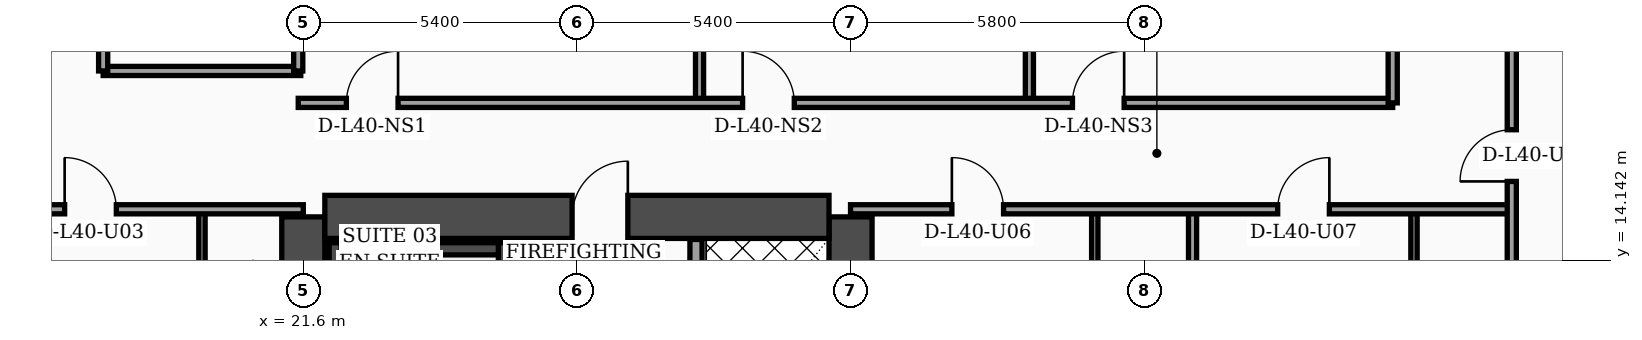
"""IFC4 building model, lengths in metres.
Left out: names, types, materials, properties, quantities, classifications, styles, units other than length and angle.
Written with IfcOpenShell. Run it as: python <this file> out.ifc"""

import sys

from ifc_helpers import new_model, si_unit, direction, frame, frame_2d, origin, place, context, subcontext, project, spatial, rectangle, extrude, element, fill, save


model = new_model("IFC4")
c1 = context("Model", 3, precision=1e-05, world=origin(), true_north=direction((0.0, 1.0)))
c2 = subcontext(c1, "Body", "Model", "MODEL_VIEW")
j1 = project(units=[si_unit("LENGTHUNIT", "METRE"), si_unit("PLANEANGLEUNIT", "RADIAN")], contexts=[c1])
p1 = place(None, origin())
s1 = spatial("IfcSite", under=j1, at=p1, CompositionType="ELEMENT")
p2 = place(p1, origin())
s2 = spatial("IfcBuilding", under=s1, at=p2, CompositionType="ELEMENT")
p3 = place(p2, frame((0.0, 0.0, 163.7)))
s3 = spatial("IfcBuildingStorey", under=s2, at=p3, CompositionType="ELEMENT", Elevation=163.7)
for number, where, z_axis, x_axis in (
    (1, (21.6, 4.6, 0.0), (0.0, 0.0, 1.0), (0.0, 1.0, 0.0)),
    (2, (32.4, 4.6, 0.0), (0.0, 0.0, 1.0), (0.0, 1.0, 0.0)),
):
    element("IfcWall", number, at=place(p3, frame(where, z_axis=z_axis, x_axis=x_axis)), inside=s3, PredefinedType="SHEAR", context=c2, shape_type="SweptSolid", body=[
        extrude(rectangle(XDim=10.4, YDim=0.85, at=frame_2d((5.2, 0.0))), origin(), (0.0, 0.0, 1.0), 3.56),
    ])
p4 = place(p3, frame((22.025, 15.0, 0.0), z_axis=(0.0, 0.0, 1.0), x_axis=(1.0, 0.0, 0.0)))
e3 = element("IfcWall", 3, at=p4, inside=s3, PredefinedType="SHEAR", context=c2, shape_type="SweptSolid", body=[
    extrude(rectangle(XDim=9.95, YDim=0.85, at=frame_2d((4.975, 0.0))), origin(), (0.0, 0.0, 1.0), 3.56),
])
p5 = place(p4, frame((4.88, 0.0, 0.0)))
e4 = element("IfcOpeningElement", 4, at=p5, cuts=e3, PredefinedType="OPENING", context=c2, shape_type="SweptSolid", body=[
    extrude(rectangle(XDim=1.1, YDim=2.2, at=frame_2d((0.55, 1.1))), frame((0.0, 0.435, 0.0), z_axis=(0.0, -1.0, 0.0), x_axis=(1.0, 0.0, 0.0)), (0.0, 0.0, 1.0), 0.87),
])
p6 = place(p3, frame((22.23, 5.025, 0.0), z_axis=(0.0, 0.0, 1.0), x_axis=(0.0, 1.0, 0.0)))
e5 = element("IfcWall", 5, at=p6, inside=s3, PredefinedType="SOLIDWALL", context=c2, shape_type="SweptSolid", body=[
    extrude(rectangle(XDim=9.465, YDim=0.24, at=frame_2d((4.732, 0.0))), origin(), (0.0, 0.0, 1.0), 3.56),
])
p7 = place(p3, frame((25.57, 5.025, 0.0), z_axis=(0.0, 0.0, 1.0), x_axis=(0.0, 1.0, 0.0)))
e6 = element("IfcWall", 6, at=p7, inside=s3, PredefinedType="SOLIDWALL", context=c2, shape_type="SweptSolid", body=[
    extrude(rectangle(XDim=9.465, YDim=0.24, at=frame_2d((4.732, 0.0))), origin(), (0.0, 0.0, 1.0), 3.56),
])
p8 = place(p7, frame((0.35, 0.0, 0.0)))
e7 = element("IfcOpeningElement", 7, at=p8, cuts=e6, PredefinedType="OPENING", context=c2, shape_type="SweptSolid", body=[
    extrude(rectangle(XDim=1.15, YDim=2.2, at=frame_2d((0.575, 1.1))), frame((0.0, 0.13, 0.0), z_axis=(0.0, -1.0, 0.0), x_axis=(1.0, 0.0, 0.0)), (0.0, 0.0, 1.0), 0.26),
])
p9 = place(p3, frame((22.35, 14.37, 0.0), z_axis=(0.0, 0.0, 1.0), x_axis=(1.0, 0.0, 0.0)))
e8 = element("IfcWall", 8, at=p9, inside=s3, PredefinedType="SOLIDWALL", context=c2, shape_type="SweptSolid", body=[
    extrude(rectangle(XDim=3.1, YDim=0.24, at=frame_2d((1.55, 0.0))), origin(), (0.0, 0.0, 1.0), 3.56),
])
p10 = place(p3, frame((29.35, 5.045, 0.0), z_axis=(0.0, 0.0, 1.0), x_axis=(0.0, 1.0, 0.0)))
e9 = element("IfcWall", 9, at=p10, inside=s3, PredefinedType="SOLIDWALL", context=c2, shape_type="SweptSolid", body=[
    extrude(rectangle(XDim=9.51, YDim=0.24, at=frame_2d((4.755, 0.0))), origin(), (0.0, 0.0, 1.0), 3.56),
])
p11 = place(p10, frame((0.55, 0.0, 0.0)))
e10 = element("IfcOpeningElement", 10, at=p11, cuts=e9, PredefinedType="OPENING", context=c2, shape_type="SweptSolid", body=[
    extrude(rectangle(XDim=1.3, YDim=2.35, at=frame_2d((0.65, 1.175))), frame((0.0, 0.13, 0.0), z_axis=(0.0, -1.0, 0.0), x_axis=(1.0, 0.0, 0.0)), (0.0, 0.0, 1.0), 0.26),
])
p12 = place(p3, frame((19.6, 2.44, 0.0), z_axis=(0.0, 0.0, 1.0), x_axis=(0.0, 1.0, 0.0)))
e11 = element("IfcWall", 11, at=p12, inside=s3, PredefinedType="PARTITIONING", context=c2, shape_type="SweptSolid", body=[
    extrude(rectangle(XDim=12.71, YDim=0.125, at=frame_2d((6.355, 0.0))), origin(), (0.0, 0.0, 1.0), 2.49),
])
p13 = place(p12, frame((4.34, 0.0, 0.0)))
e12 = element("IfcOpeningElement", 12, at=p13, cuts=e11, PredefinedType="OPENING", context=c2, shape_type="SweptSolid", body=[
    extrude(rectangle(XDim=0.96, YDim=2.2, at=frame_2d((0.48, 1.1))), frame((0.0, 0.073, 0.0), z_axis=(0.0, -1.0, 0.0), x_axis=(1.0, 0.0, 0.0)), (0.0, 0.0, 1.0), 0.145),
])
p14 = place(p12, frame((10.18, 0.0, 0.0)))
e13 = element("IfcOpeningElement", 13, at=p14, cuts=e11, PredefinedType="OPENING", context=c2, shape_type="SweptSolid", body=[
    extrude(rectangle(XDim=0.9, YDim=2.15, at=frame_2d((0.45, 1.075))), frame((0.0, 0.073, 0.0), z_axis=(0.0, -1.0, 0.0), x_axis=(1.0, 0.0, 0.0)), (0.0, 0.0, 1.0), 0.145),
])
p15 = place(p3, frame((15.15, 15.15, 0.0), z_axis=(0.0, 0.0, 1.0), x_axis=(1.0, 0.0, 0.0)))
e14 = element("IfcWall", 14, at=p15, inside=s3, PredefinedType="PARTITIONING", context=c2, shape_type="SweptSolid", body=[
    extrude(rectangle(XDim=6.45, YDim=0.18, at=frame_2d((3.225, 0.0))), origin(), (0.0, 0.0, 1.0), 2.49),
])
p16 = place(p15, frame((1.74, 0.0, 0.0)))
e15 = element("IfcOpeningElement", 15, at=p16, cuts=e14, PredefinedType="OPENING", context=c2, shape_type="SweptSolid", body=[
    extrude(rectangle(XDim=1.02, YDim=2.2, at=frame_2d((0.51, 1.1))), frame((0.0, 0.1, 0.0), z_axis=(0.0, -1.0, 0.0), x_axis=(1.0, 0.0, 0.0)), (0.0, 0.0, 1.0), 0.2),
])
p17 = place(p3, frame((17.65, 17.88, 0.0), z_axis=(0.0, 0.0, 1.0), x_axis=(1.0, 0.0, 0.0)))
e16 = element("IfcWall", 16, at=p17, inside=s3, PredefinedType="PARTITIONING", context=c2, shape_type="SweptSolid", body=[
    extrude(rectangle(XDim=3.9, YDim=0.18, at=frame_2d((1.95, 0.0))), origin(), (0.0, 0.0, 1.0), 3.56),
])
p18 = place(p3, frame((21.5, 17.88, 0.0), z_axis=(0.0, 0.0, 1.0), x_axis=(0.0, 1.0, 0.0)))
e17 = element("IfcWall", 17, at=p18, inside=s3, PredefinedType="PARTITIONING", context=c2, shape_type="SweptSolid", body=[
    extrude(rectangle(XDim=6.44, YDim=0.18, at=frame_2d((3.22, 0.0))), origin(), (0.0, 0.0, 1.0), 3.56),
])
p19 = place(p3, frame((17.65, 17.88, 0.0), z_axis=(0.0, 0.0, 1.0), x_axis=(0.0, 1.0, 0.0)))
e18 = element("IfcWall", 18, at=p19, inside=s3, PredefinedType="PARTITIONING", context=c2, shape_type="SweptSolid", body=[
    extrude(rectangle(XDim=6.44, YDim=0.18, at=frame_2d((3.22, 0.0))), origin(), (0.0, 0.0, 1.0), 3.56),
])
p20 = place(p19, frame((0.65, 0.0, 0.0)))
e19 = element("IfcOpeningElement", 19, at=p20, cuts=e18, PredefinedType="OPENING", context=c2, shape_type="SweptSolid", body=[
    extrude(rectangle(XDim=0.98, YDim=2.15, at=frame_2d((0.49, 1.075))), frame((0.0, 0.1, 0.0), z_axis=(0.0, -1.0, 0.0), x_axis=(1.0, 0.0, 0.0)), (0.0, 0.0, 1.0), 0.2),
])
p21 = place(p19, frame((3.97, 0.0, 0.0)))
e20 = element("IfcOpeningElement", 20, at=p21, cuts=e18, PredefinedType="OPENING", context=c2, shape_type="SweptSolid", body=[
    extrude(rectangle(XDim=0.96, YDim=2.2, at=frame_2d((0.48, 1.1))), frame((0.0, 0.1, 0.0), z_axis=(0.0, -1.0, 0.0), x_axis=(1.0, 0.0, 0.0)), (0.0, 0.0, 1.0), 0.2),
])
p22 = place(p3, frame((37.22, 2.44, 0.0), z_axis=(0.0, 0.0, 1.0), x_axis=(0.0, 1.0, 0.0)))
e21 = element("IfcWall", 21, at=p22, inside=s3, PredefinedType="PARTITIONING", context=c2, shape_type="SweptSolid", body=[
    extrude(rectangle(XDim=12.71, YDim=0.125, at=frame_2d((6.355, 0.0))), origin(), (0.0, 0.0, 1.0), 2.94),
])
p23 = place(p22, frame((4.35, 0.0, 0.0)))
e22 = element("IfcOpeningElement", 22, at=p23, cuts=e21, PredefinedType="OPENING", context=c2, shape_type="SweptSolid", body=[
    extrude(rectangle(XDim=0.96, YDim=2.2, at=frame_2d((0.48, 1.1))), frame((0.0, 0.073, 0.0), z_axis=(0.0, -1.0, 0.0), x_axis=(1.0, 0.0, 0.0)), (0.0, 0.0, 1.0), 0.145),
])
p24 = place(p22, frame((10.21, 0.0, 0.0)))
e23 = element("IfcOpeningElement", 23, at=p24, cuts=e21, PredefinedType="OPENING", context=c2, shape_type="SweptSolid", body=[
    extrude(rectangle(XDim=0.9, YDim=2.15, at=frame_2d((0.45, 1.075))), frame((0.0, 0.073, 0.0), z_axis=(0.0, -1.0, 0.0), x_axis=(1.0, 0.0, 0.0)), (0.0, 0.0, 1.0), 0.145),
])
p25 = place(p3, frame((43.52, 2.44, 0.0), z_axis=(0.0, 0.0, 1.0), x_axis=(0.0, 1.0, 0.0)))
e24 = element("IfcWall", 24, at=p25, inside=s3, PredefinedType="PARTITIONING", context=c2, shape_type="SweptSolid", body=[
    extrude(rectangle(XDim=12.71, YDim=0.125, at=frame_2d((6.355, 0.0))), origin(), (0.0, 0.0, 1.0), 3.04),
])
p26 = place(p25, frame((4.35, 0.0, 0.0)))
e25 = element("IfcOpeningElement", 25, at=p26, cuts=e24, PredefinedType="OPENING", context=c2, shape_type="SweptSolid", body=[
    extrude(rectangle(XDim=0.96, YDim=2.2, at=frame_2d((0.48, 1.1))), frame((0.0, 0.073, 0.0), z_axis=(0.0, -1.0, 0.0), x_axis=(1.0, 0.0, 0.0)), (0.0, 0.0, 1.0), 0.145),
])
p27 = place(p25, frame((10.21, 0.0, 0.0)))
e26 = element("IfcOpeningElement", 26, at=p27, cuts=e24, PredefinedType="OPENING", context=c2, shape_type="SweptSolid", body=[
    extrude(rectangle(XDim=0.9, YDim=2.15, at=frame_2d((0.45, 1.075))), frame((0.0, 0.073, 0.0), z_axis=(0.0, -1.0, 0.0), x_axis=(1.0, 0.0, 0.0)), (0.0, 0.0, 1.0), 0.145),
])
p28 = place(p3, frame((39.15, 2.44, 0.0), z_axis=(0.0, 0.0, 1.0), x_axis=(0.0, 1.0, 0.0)))
e27 = element("IfcWall", 27, at=p28, inside=s3, PredefinedType="PARTITIONING", context=c2, shape_type="SweptSolid", body=[
    extrude(rectangle(XDim=12.71, YDim=0.16, at=frame_2d((6.355, 0.0))), origin(), (0.0, 0.0, 1.0), 2.94),
])
p29 = place(p3, frame((32.4, 15.15, 0.0), z_axis=(0.0, 0.0, 1.0), x_axis=(1.0, 0.0, 0.0)))
e28 = element("IfcWall", 28, at=p29, inside=s3, PredefinedType="PARTITIONING", context=c2, shape_type="SweptSolid", body=[
    extrude(rectangle(XDim=13.05, YDim=0.18, at=frame_2d((6.525, 0.0))), origin(), (0.0, 0.0, 1.0), 2.94),
])
p30 = place(p29, frame((2.0, 0.0, 0.0)))
e29 = element("IfcOpeningElement", 29, at=p30, cuts=e28, PredefinedType="OPENING", context=c2, shape_type="SweptSolid", body=[
    extrude(rectangle(XDim=1.02, YDim=2.2, at=frame_2d((0.51, 1.1))), frame((0.0, 0.1, 0.0), z_axis=(0.0, -1.0, 0.0), x_axis=(1.0, 0.0, 0.0)), (0.0, 0.0, 1.0), 0.2),
])
p31 = place(p29, frame((8.43, 0.0, 0.0)))
e30 = element("IfcOpeningElement", 30, at=p31, cuts=e28, PredefinedType="OPENING", context=c2, shape_type="SweptSolid", body=[
    extrude(rectangle(XDim=1.02, YDim=2.2, at=frame_2d((0.51, 1.1))), frame((0.0, 0.1, 0.0), z_axis=(0.0, -1.0, 0.0), x_axis=(1.0, 0.0, 0.0)), (0.0, 0.0, 1.0), 0.2),
])
p32 = place(p3, frame((29.42, 17.25, 0.0), z_axis=(0.0, 0.0, 1.0), x_axis=(0.0, 1.0, 0.0)))
e31 = element("IfcWall", 31, at=p32, inside=s3, PredefinedType="PARTITIONING", context=c2, shape_type="SweptSolid", body=[
    extrude(rectangle(XDim=11.59, YDim=0.16, at=frame_2d((5.795, 0.0))), origin(), (0.0, 0.0, 1.0), 2.94),
])
p33 = place(p3, frame((35.93, 17.25, 0.0), z_axis=(0.0, 0.0, 1.0), x_axis=(0.0, 1.0, 0.0)))
e32 = element("IfcWall", 32, at=p33, inside=s3, PredefinedType="PARTITIONING", context=c2, shape_type="SweptSolid", body=[
    extrude(rectangle(XDim=15.22, YDim=0.16, at=frame_2d((7.61, 0.0))), origin(), (0.0, 0.0, 1.0), 2.94),
])
p34 = place(p3, frame((21.5, 17.25, 0.0), z_axis=(0.0, 0.0, 1.0), x_axis=(1.0, 0.0, 0.0)))
e33 = element("IfcWall", 33, at=p34, inside=s3, PredefinedType="PARTITIONING", context=c2, shape_type="SweptSolid", body=[
    extrude(rectangle(XDim=21.6, YDim=0.18, at=frame_2d((10.8, 0.0))), origin(), (0.0, 0.0, 1.0), 2.94),
])
p35 = place(p34, frame((0.95, 0.0, 0.0)))
e34 = element("IfcOpeningElement", 34, at=p35, cuts=e33, PredefinedType="OPENING", context=c2, shape_type="SweptSolid", body=[
    extrude(rectangle(XDim=1.02, YDim=2.2, at=frame_2d((0.51, 1.1))), frame((0.0, 0.1, 0.0), z_axis=(0.0, -1.0, 0.0), x_axis=(1.0, 0.0, 0.0)), (0.0, 0.0, 1.0), 0.2),
])
p36 = place(p34, frame((8.77, 0.0, 0.0)))
e35 = element("IfcOpeningElement", 35, at=p36, cuts=e33, PredefinedType="OPENING", context=c2, shape_type="SweptSolid", body=[
    extrude(rectangle(XDim=1.02, YDim=2.2, at=frame_2d((0.51, 1.1))), frame((0.0, 0.1, 0.0), z_axis=(0.0, -1.0, 0.0), x_axis=(1.0, 0.0, 0.0)), (0.0, 0.0, 1.0), 0.2),
])
p37 = place(p34, frame((15.28, 0.0, 0.0)))
e36 = element("IfcOpeningElement", 36, at=p37, cuts=e33, PredefinedType="OPENING", context=c2, shape_type="SweptSolid", body=[
    extrude(rectangle(XDim=1.02, YDim=2.2, at=frame_2d((0.51, 1.1))), frame((0.0, 0.1, 0.0), z_axis=(0.0, -1.0, 0.0), x_axis=(1.0, 0.0, 0.0)), (0.0, 0.0, 1.0), 0.2),
])
p38 = place(p3, frame((43.1, 17.25, 0.0), z_axis=(0.0, 0.0, 1.0), x_axis=(0.0, 1.0, 0.0)))
e37 = element("IfcWall", 37, at=p38, inside=s3, PredefinedType="PARTITIONING", context=c2, shape_type="SweptSolid", body=[
    extrude(rectangle(XDim=19.21, YDim=0.18, at=frame_2d((9.605, 0.0))), origin(), (0.0, 0.0, 1.0), 2.94),
])
p39 = place(p3, frame((45.45, 2.44, 0.0), z_axis=(0.0, 0.0, 1.0), x_axis=(0.0, 1.0, 0.0)))
e38 = element("IfcWall", 38, at=p39, inside=s3, PredefinedType="PARTITIONING", context=c2, shape_type="SweptSolid", body=[
    extrude(rectangle(XDim=27.84, YDim=0.18, at=frame_2d((13.92, 0.0))), origin(), (0.0, 0.0, 1.0), 2.94),
])
p40 = place(p39, frame((13.26, 0.0, 0.0)))
e39 = element("IfcOpeningElement", 39, at=p40, cuts=e38, PredefinedType="OPENING", context=c2, shape_type="SweptSolid", body=[
    extrude(rectangle(XDim=1.02, YDim=2.2, at=frame_2d((0.51, 1.1))), frame((0.0, 0.1, 0.0), z_axis=(0.0, -1.0, 0.0), x_axis=(1.0, 0.0, 0.0)), (0.0, 0.0, 1.0), 0.2),
])
p41 = place(p39, frame((21.52, 0.0, 0.0)))
e40 = element("IfcOpeningElement", 40, at=p41, cuts=e38, PredefinedType="OPENING", context=c2, shape_type="SweptSolid", body=[
    extrude(rectangle(XDim=1.02, YDim=2.2, at=frame_2d((0.51, 1.1))), frame((0.0, 0.1, 0.0), z_axis=(0.0, -1.0, 0.0), x_axis=(1.0, 0.0, 0.0)), (0.0, 0.0, 1.0), 0.2),
])
p42 = place(p16, origin())
e41 = element("IfcDoor", 41, at=p42, inside=s3, OperationType="SINGLE_SWING_LEFT", PredefinedType="DOOR", context=c2, shape_type="SweptSolid", body=[
    extrude(rectangle(XDim=1.02, YDim=2.2, at=frame_2d((0.51, 1.1))), frame((0.0, 0.025, 0.0), z_axis=(0.0, -1.0, 0.0), x_axis=(1.0, 0.0, 0.0)), (0.0, 0.0, 1.0), 0.05),
])
fill(e15, e41)
p43 = place(p30, origin())
e42 = element("IfcDoor", 42, at=p43, inside=s3, OperationType="SINGLE_SWING_LEFT", PredefinedType="DOOR", context=c2, shape_type="SweptSolid", body=[
    extrude(rectangle(XDim=1.02, YDim=2.2, at=frame_2d((0.51, 1.1))), frame((0.0, 0.025, 0.0), z_axis=(0.0, -1.0, 0.0), x_axis=(1.0, 0.0, 0.0)), (0.0, 0.0, 1.0), 0.05),
])
fill(e29, e42)
p44 = place(p31, origin())
e43 = element("IfcDoor", 43, at=p44, inside=s3, OperationType="SINGLE_SWING_RIGHT", PredefinedType="DOOR", context=c2, shape_type="SweptSolid", body=[
    extrude(rectangle(XDim=1.02, YDim=2.2, at=frame_2d((0.51, 1.1))), frame((0.0, 0.025, 0.0), z_axis=(0.0, -1.0, 0.0), x_axis=(1.0, 0.0, 0.0)), (0.0, 0.0, 1.0), 0.05),
])
fill(e30, e43)
p45 = place(p35, origin())
e44 = element("IfcDoor", 44, at=p45, inside=s3, OperationType="SINGLE_SWING_RIGHT", PredefinedType="DOOR", context=c2, shape_type="SweptSolid", body=[
    extrude(rectangle(XDim=1.02, YDim=2.2, at=frame_2d((0.51, 1.1))), frame((0.0, 0.025, 0.0), z_axis=(0.0, -1.0, 0.0), x_axis=(1.0, 0.0, 0.0)), (0.0, 0.0, 1.0), 0.05),
])
fill(e34, e44)
p46 = place(p36, origin())
e45 = element("IfcDoor", 45, at=p46, inside=s3, OperationType="SINGLE_SWING_LEFT", PredefinedType="DOOR", context=c2, shape_type="SweptSolid", body=[
    extrude(rectangle(XDim=1.02, YDim=2.2, at=frame_2d((0.51, 1.1))), frame((0.0, 0.025, 0.0), z_axis=(0.0, -1.0, 0.0), x_axis=(1.0, 0.0, 0.0)), (0.0, 0.0, 1.0), 0.05),
])
fill(e35, e45)
p47 = place(p37, origin())
e46 = element("IfcDoor", 46, at=p47, inside=s3, OperationType="SINGLE_SWING_RIGHT", PredefinedType="DOOR", context=c2, shape_type="SweptSolid", body=[
    extrude(rectangle(XDim=1.02, YDim=2.2, at=frame_2d((0.51, 1.1))), frame((0.0, 0.025, 0.0), z_axis=(0.0, -1.0, 0.0), x_axis=(1.0, 0.0, 0.0)), (0.0, 0.0, 1.0), 0.05),
])
fill(e36, e46)
p48 = place(p40, origin())
e47 = element("IfcDoor", 47, at=p48, inside=s3, OperationType="SINGLE_SWING_LEFT", PredefinedType="DOOR", context=c2, shape_type="SweptSolid", body=[
    extrude(rectangle(XDim=1.02, YDim=2.2, at=frame_2d((0.51, 1.1))), frame((0.0, 0.025, 0.0), z_axis=(0.0, -1.0, 0.0), x_axis=(1.0, 0.0, 0.0)), (0.0, 0.0, 1.0), 0.05),
])
fill(e39, e47)
p49 = place(p5, origin())
e48 = element("IfcDoor", 48, at=p49, inside=s3, OperationType="SINGLE_SWING_RIGHT", PredefinedType="DOOR", context=c2, shape_type="SweptSolid", body=[
    extrude(rectangle(XDim=1.1, YDim=2.2, at=frame_2d((0.55, 1.1))), frame((0.0, 0.025, 0.0), z_axis=(0.0, -1.0, 0.0), x_axis=(1.0, 0.0, 0.0)), (0.0, 0.0, 1.0), 0.05),
])
fill(e4, e48)
save(model, sys.argv[1])
